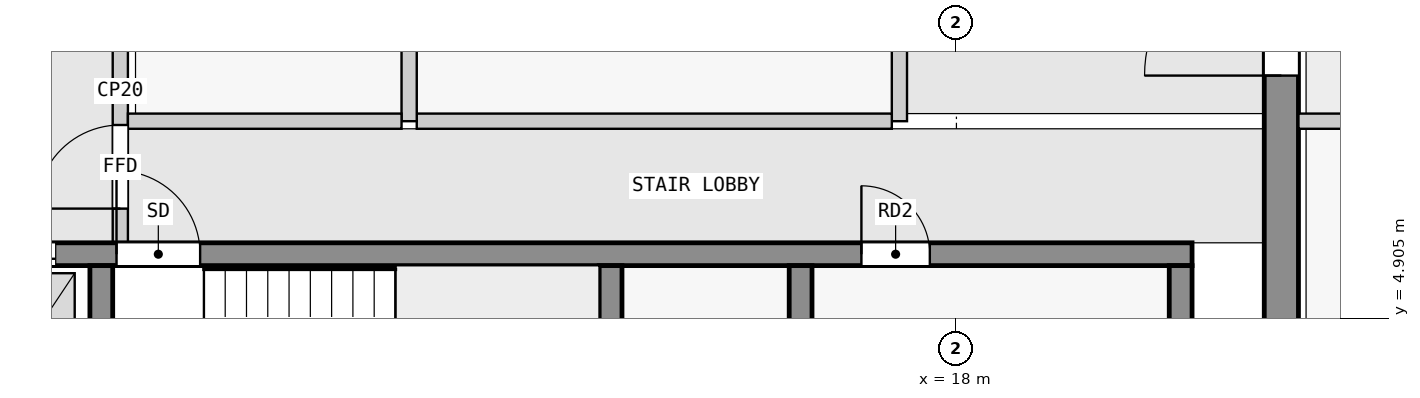
"""IFC4 building model, lengths in metres.
Left out: names, types, materials, properties, quantities, classifications, styles, units other than length and angle.
Written with IfcOpenShell. Run it as: python <this file> out.ifc"""

import sys

from ifc_helpers import new_model, si_unit, direction, frame, frame_2d, origin, place, context, subcontext, project, spatial, rectangle, extrude, element, fill, save


model = new_model("IFC4")
c1 = context("Model", 3, precision=1e-05, world=origin(), true_north=direction((0.0, 1.0)))
c2 = subcontext(c1, "Body", "Model", "MODEL_VIEW")
j1 = project(units=[si_unit("LENGTHUNIT", "METRE"), si_unit("PLANEANGLEUNIT", "RADIAN")], contexts=[c1])
p1 = place(None, origin())
s1 = spatial("IfcSite", under=j1, at=p1, CompositionType="ELEMENT")
p2 = place(p1, origin())
s2 = spatial("IfcBuilding", under=s1, at=p2, CompositionType="ELEMENT")
p3 = place(p2, frame((0.0, 0.0, 287.9)))
s3 = spatial("IfcBuildingStorey", under=s2, at=p3, CompositionType="ELEMENT", Elevation=287.9)
p4 = place(p3, frame((22.275, 2.5, 0.0), z_axis=(0.0, 0.0, 1.0), x_axis=(0.0, 1.0, 0.0)))
e1 = element("IfcWall", 1, at=p4, inside=s3, PredefinedType="SHEAR", context=c2, shape_type="SweptSolid", body=[
    extrude(rectangle(XDim=15.05, YDim=0.45, at=frame_2d((7.525, 0.0))), origin(), (0.0, 0.0, 1.0), 3.25),
])
p5 = place(p4, frame((5.6, 0.0, 0.0)))
e2 = element("IfcOpeningElement", 2, at=p5, cuts=e1, PredefinedType="OPENING", context=c2, shape_type="SweptSolid", body=[
    extrude(rectangle(XDim=1.8, YDim=2.1, at=frame_2d((0.9, 1.05))), frame((0.0, 0.235, 0.0), z_axis=(0.0, -1.0, 0.0), x_axis=(1.0, 0.0, 0.0)), (0.0, 0.0, 1.0), 0.47),
])
for number, where, z_axis, x_axis in (
    (3, (6.75, 2.8, 0.0), (0.0, 0.0, 1.0), (0.0, 1.0, 0.0)),
    (4, (13.45, 2.8, 0.0), (0.0, 0.0, 1.0), (0.0, 1.0, 0.0)),
    (5, (20.95, 2.8, 0.0), (0.0, 0.0, 1.0), (0.0, 1.0, 0.0)),
):
    element("IfcWall", number, at=place(p3, frame(where, z_axis=z_axis, x_axis=x_axis)), inside=s3, PredefinedType="SHEAR", context=c2, shape_type="SweptSolid", body=[
        extrude(rectangle(XDim=2.8, YDim=0.3, at=frame_2d((1.4, 0.0))), origin(), (0.0, 0.0, 1.0), 3.25),
    ])
p6 = place(p3, frame((2.3, 5.75, 0.0), z_axis=(0.0, 0.0, 1.0), x_axis=(1.0, 0.0, 0.0)))
e6 = element("IfcWall", 6, at=p6, inside=s3, PredefinedType="SHEAR", context=c2, shape_type="SweptSolid", body=[
    extrude(rectangle(XDim=18.8, YDim=0.3, at=frame_2d((9.4, 0.0))), origin(), (0.0, 0.0, 1.0), 3.25),
])
p7 = place(p6, frame((4.65, 0.0, 0.0)))
e7 = element("IfcOpeningElement", 7, at=p7, cuts=e6, PredefinedType="OPENING", context=c2, shape_type="SweptSolid", body=[
    extrude(rectangle(XDim=1.1, YDim=2.1, at=frame_2d((0.55, 1.05))), frame((0.0, 0.16, 0.0), z_axis=(0.0, -1.0, 0.0), x_axis=(1.0, 0.0, 0.0)), (0.0, 0.0, 1.0), 0.32),
])
p8 = place(p6, frame((0.45, 0.0, 0.0)))
e8 = element("IfcOpeningElement", 8, at=p8, cuts=e6, PredefinedType="OPENING", context=c2, shape_type="SweptSolid", body=[
    extrude(rectangle(XDim=1.1, YDim=2.1, at=frame_2d((0.55, 1.05))), frame((0.0, 0.16, 0.0), z_axis=(0.0, -1.0, 0.0), x_axis=(1.0, 0.0, 0.0)), (0.0, 0.0, 1.0), 0.32),
])
p9 = place(p6, frame((2.75, 0.0, 0.0)))
e9 = element("IfcOpeningElement", 9, at=p9, cuts=e6, PredefinedType="OPENING", context=c2, shape_type="SweptSolid", body=[
    extrude(rectangle(XDim=1.1, YDim=2.1, at=frame_2d((0.55, 1.05))), frame((0.0, 0.16, 0.0), z_axis=(0.0, -1.0, 0.0), x_axis=(1.0, 0.0, 0.0)), (0.0, 0.0, 1.0), 0.32),
])
p10 = place(p6, frame((14.45, 0.0, 0.0)))
e10 = element("IfcOpeningElement", 10, at=p10, cuts=e6, PredefinedType="OPENING", context=c2, shape_type="SweptSolid", body=[
    extrude(rectangle(XDim=0.9, YDim=2.1, at=frame_2d((0.45, 1.05))), frame((0.0, 0.16, 0.0), z_axis=(0.0, -1.0, 0.0), x_axis=(1.0, 0.0, 0.0)), (0.0, 0.0, 1.0), 0.32),
])
p11 = place(p3, frame((7.0, 5.9, 0.0), z_axis=(0.0, 0.0, 1.0), x_axis=(0.0, 1.0, 0.0)))
e11 = element("IfcWall", 11, at=p11, inside=s3, PredefinedType="PARTITIONING", context=c2, shape_type="SweptSolid", body=[
    extrude(rectangle(XDim=4.0, YDim=0.2, at=frame_2d((2.0, 0.0))), origin(), (0.0, 0.0, 1.0), 3.25),
])
p12 = place(p11, frame((0.45, 0.0, 0.0)))
e12 = element("IfcOpeningElement", 12, at=p12, cuts=e11, PredefinedType="OPENING", context=c2, shape_type="SweptSolid", body=[
    extrude(rectangle(XDim=1.1, YDim=2.1, at=frame_2d((0.55, 1.05))), frame((0.0, 0.11, 0.0), z_axis=(0.0, -1.0, 0.0), x_axis=(1.0, 0.0, 0.0)), (0.0, 0.0, 1.0), 0.22),
])
p13 = place(p3, frame((7.1, 7.5, 0.0), z_axis=(0.0, 0.0, 1.0), x_axis=(1.0, 0.0, 0.0)))
e13 = element("IfcWall", 13, at=p13, inside=s3, PredefinedType="PARTITIONING", context=c2, shape_type="SweptSolid", body=[
    extrude(rectangle(XDim=3.6, YDim=0.2, at=frame_2d((1.8, 0.0))), origin(), (0.0, 0.0, 1.0), 3.25),
])
p14 = place(p3, frame((10.8, 7.5, 0.0), z_axis=(0.0, 0.0, 1.0), x_axis=(0.0, 1.0, 0.0)))
e14 = element("IfcWall", 14, at=p14, inside=s3, PredefinedType="PARTITIONING", context=c2, shape_type="SweptSolid", body=[
    extrude(rectangle(XDim=4.7, YDim=0.2, at=frame_2d((2.35, 0.0))), origin(), (0.0, 0.0, 1.0), 3.25),
])
p15 = place(p3, frame((10.9, 7.5, 0.0), z_axis=(0.0, 0.0, 1.0), x_axis=(1.0, 0.0, 0.0)))
e15 = element("IfcWall", 15, at=p15, inside=s3, PredefinedType="PARTITIONING", context=c2, shape_type="SweptSolid", body=[
    extrude(rectangle(XDim=6.25, YDim=0.2, at=frame_2d((3.125, 0.0))), origin(), (0.0, 0.0, 1.0), 3.25),
])
p16 = place(p3, frame((17.25, 7.5, 0.0), z_axis=(0.0, 0.0, 1.0), x_axis=(0.0, 1.0, 0.0)))
e16 = element("IfcWall", 16, at=p16, inside=s3, PredefinedType="PARTITIONING", context=c2, shape_type="SweptSolid", body=[
    extrude(rectangle(XDim=4.7, YDim=0.2, at=frame_2d((2.35, 0.0))), origin(), (0.0, 0.0, 1.0), 3.25),
])
p17 = place(p3, frame((27.0, 7.5, 0.0), z_axis=(0.0, 0.0, 1.0), x_axis=(-1.0, 0.0, 0.0)))
e17 = element("IfcWall", 17, at=p17, inside=s3, PredefinedType="PARTITIONING", context=c2, shape_type="SweptSolid", body=[
    extrude(rectangle(XDim=4.5, YDim=0.2, at=frame_2d((2.25, 0.0))), origin(), (0.0, 0.0, 1.0), 3.25),
])
p18 = place(p3, frame((15.95, 2.8, 0.0), z_axis=(0.0, 0.0, 1.0), x_axis=(0.0, 1.0, 0.0)))
e18 = element("IfcWall", 18, at=p18, inside=s3, PredefinedType="SHEAR", context=c2, shape_type="SweptSolid", body=[
    extrude(rectangle(XDim=2.8, YDim=0.3, at=frame_2d((1.4, 0.0))), origin(), (0.0, 0.0, 1.0), 3.25),
])
p19 = place(p12, origin())
e19 = element("IfcDoor", 19, at=p19, inside=s3, OperationType="SINGLE_SWING_LEFT", PredefinedType="DOOR", context=c2, shape_type="SweptSolid", body=[
    extrude(rectangle(XDim=1.1, YDim=2.1, at=frame_2d((0.55, 1.05))), frame((0.0, 0.025, 0.0), z_axis=(0.0, -1.0, 0.0), x_axis=(1.0, 0.0, 0.0)), (0.0, 0.0, 1.0), 0.05),
])
fill(e12, e19)
p20 = place(p7, origin())
e20 = element("IfcDoor", 20, at=p20, inside=s3, OperationType="SINGLE_SWING_LEFT", PredefinedType="DOOR", context=c2, shape_type="SweptSolid", body=[
    extrude(rectangle(XDim=1.1, YDim=2.1, at=frame_2d((0.55, 1.05))), frame((0.0, 0.025, 0.0), z_axis=(0.0, -1.0, 0.0), x_axis=(1.0, 0.0, 0.0)), (0.0, 0.0, 1.0), 0.05),
])
fill(e7, e20)
p21 = place(p9, origin())
e21 = element("IfcDoor", 21, at=p21, inside=s3, OperationType="DOUBLE_DOOR_SLIDING", PredefinedType="DOOR", context=c2, shape_type="SweptSolid", body=[
    extrude(rectangle(XDim=1.1, YDim=2.1, at=frame_2d((0.55, 1.05))), frame((0.0, 0.025, 0.0), z_axis=(0.0, -1.0, 0.0), x_axis=(1.0, 0.0, 0.0)), (0.0, 0.0, 1.0), 0.05),
])
fill(e9, e21)
p22 = place(p5, origin())
e22 = element("IfcDoor", 22, at=p22, inside=s3, OperationType="DOUBLE_DOOR_SINGLE_SWING", PredefinedType="DOOR", context=c2, shape_type="SweptSolid", body=[
    extrude(rectangle(XDim=1.8, YDim=2.1, at=frame_2d((0.9, 1.05))), frame((0.0, 0.025, 0.0), z_axis=(0.0, -1.0, 0.0), x_axis=(1.0, 0.0, 0.0)), (0.0, 0.0, 1.0), 0.05),
])
fill(e2, e22)
p23 = place(p10, origin())
e23 = element("IfcDoor", 23, at=p23, inside=s3, OperationType="SINGLE_SWING_LEFT", PredefinedType="DOOR", context=c2, shape_type="SweptSolid", body=[
    extrude(rectangle(XDim=0.9, YDim=2.1, at=frame_2d((0.45, 1.05))), frame((0.0, 0.025, 0.0), z_axis=(0.0, -1.0, 0.0), x_axis=(1.0, 0.0, 0.0)), (0.0, 0.0, 1.0), 0.05),
])
fill(e10, e23)
save(model, sys.argv[1])
